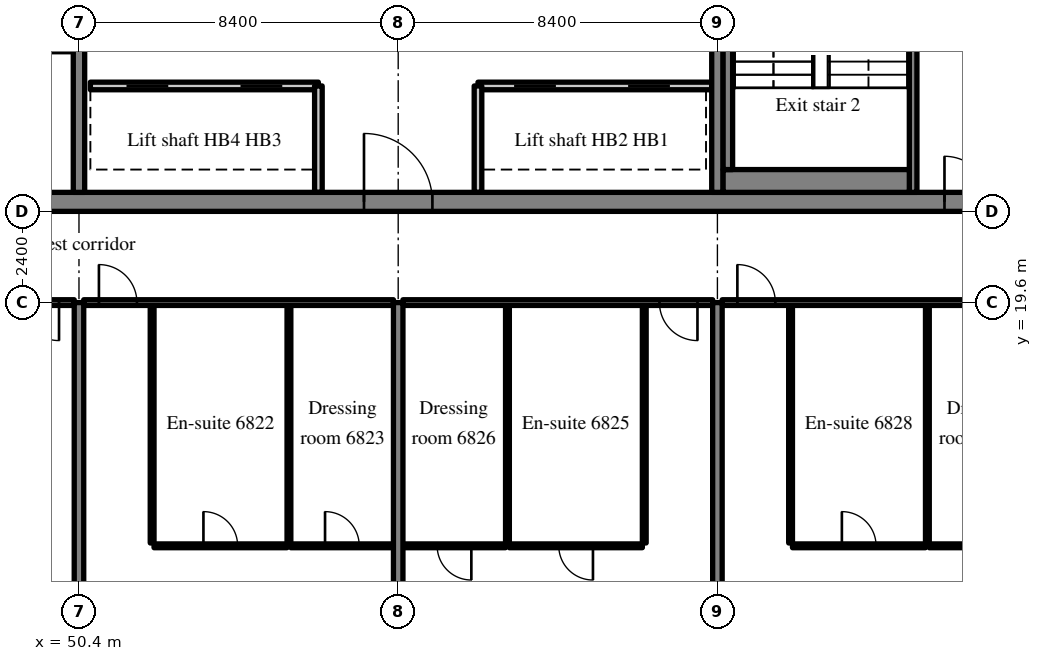
"""IFC4 building model, lengths in metres.
Left out: names, types, materials, properties, quantities, classifications, styles, units other than length and angle.
Written with IfcOpenShell. Run it as: python <this file> out.ifc"""

import sys

from ifc_helpers import new_model, si_unit, direction, frame, frame_2d, origin, place, context, subcontext, project, spatial, rectangle, extrude, source, transform, mapped, element, fill, save


model = new_model("IFC4")
c1 = context("Model", 3, precision=1e-05, world=origin(), true_north=direction((0.0, 1.0)))
c2 = subcontext(c1, "Body", "Model", "MODEL_VIEW")
j1 = project(units=[si_unit("LENGTHUNIT", "METRE"), si_unit("PLANEANGLEUNIT", "RADIAN")], contexts=[c1])
p1 = place(None, origin())
s1 = spatial("IfcSite", under=j1, at=p1, CompositionType="ELEMENT")
p2 = place(p1, origin())
s2 = spatial("IfcBuilding", under=s1, at=p2, CompositionType="ELEMENT")
p3 = place(p2, frame((0.0, 0.0, 285.7)))
s3 = spatial("IfcBuildingStorey", under=s2, at=p3, CompositionType="ELEMENT", Elevation=285.7)
m1 = source(origin(), c2, "Body", "SweptSolid", [
    extrude(rectangle(XDim=50.4, YDim=0.5, at=frame_2d((25.2, 0.0))), origin(), (0.0, 0.0, 1.0), 3.72),
])
p4 = place(p3, frame((25.2, 22.25, 0.0), z_axis=(0.0, 0.0, 1.0), x_axis=(1.0, 0.0, 0.0)))
e1 = element("IfcWall", 1, at=p4, inside=s3, PredefinedType="SHEAR", context=c2, shape_type="MappedRepresentation", body=[
    mapped(m1, transform((0.0, 0.0, 0.0), scale=1.0)),
])
m2 = source(origin(), c2, "Body", "SweptSolid", [
    extrude(rectangle(XDim=1.8, YDim=2.1, at=frame_2d((0.9, 1.05))), frame((0.0, 0.26, 0.0), z_axis=(0.0, -1.0, 0.0), x_axis=(1.0, 0.0, 0.0)), (0.0, 0.0, 1.0), 0.52),
])
p5 = place(p4, frame((15.9, 0.0, 0.0)))
e2 = element("IfcOpeningElement", 2, at=p5, cuts=e1, PredefinedType="OPENING", context=c2, shape_type="MappedRepresentation", body=[
    mapped(m2, transform((0.0, 0.0, 0.0), scale=1.0)),
])
m3 = source(origin(), c2, "Body", "SweptSolid", [
    extrude(rectangle(XDim=0.9, YDim=2.1, at=frame_2d((0.45, 1.05))), frame((0.0, 0.26, 0.0), z_axis=(0.0, -1.0, 0.0), x_axis=(1.0, 0.0, 0.0)), (0.0, 0.0, 1.0), 0.52),
])
p6 = place(p4, frame((21.525, 0.0, 0.0)))
e3 = element("IfcOpeningElement", 3, at=p6, cuts=e1, PredefinedType="OPENING", context=c2, shape_type="MappedRepresentation", body=[
    mapped(m3, transform((0.0, 0.0, 0.0), scale=1.0)),
])
p7 = place(p4, frame((32.7, 0.0, 0.0)))
e4 = element("IfcOpeningElement", 4, at=p7, cuts=e1, PredefinedType="OPENING", context=c2, shape_type="MappedRepresentation", body=[
    mapped(m2, transform((0.0, 0.0, 0.0), scale=1.0)),
])
m4 = source(origin(), c2, "Body", "SweptSolid", [
    extrude(rectangle(XDim=1.2, YDim=2.1, at=frame_2d((0.6, 1.05))), frame((0.0, 0.26, 0.0), z_axis=(0.0, -1.0, 0.0), x_axis=(1.0, 0.0, 0.0)), (0.0, 0.0, 1.0), 0.52),
])
p8 = place(p4, frame((6.5, 0.0, 0.0)))
e5 = element("IfcOpeningElement", 5, at=p8, cuts=e1, PredefinedType="OPENING", context=c2, shape_type="MappedRepresentation", body=[
    mapped(m4, transform((0.0, 0.0, 0.0), scale=1.0)),
])
p9 = place(p4, frame((47.975, 0.0, 0.0)))
e6 = element("IfcOpeningElement", 6, at=p9, cuts=e1, PredefinedType="OPENING", context=c2, shape_type="MappedRepresentation", body=[
    mapped(m4, transform((0.0, 0.0, 0.0), scale=1.0)),
])
m5 = source(origin(), c2, "Body", "SweptSolid", [
    extrude(rectangle(XDim=19.0, YDim=0.3, at=frame_2d((9.5, 0.0))), origin(), (0.0, 0.0, 1.0), 3.72),
])
p10 = place(p3, frame((50.4, 22.5, 0.0), z_axis=(0.0, 0.0, 1.0), x_axis=(0.0, 1.0, 0.0)))
e7 = element("IfcWall", 7, at=p10, inside=s3, PredefinedType="SHEAR", context=c2, shape_type="MappedRepresentation", body=[
    mapped(m5, transform((0.0, 0.0, 0.0), scale=1.0)),
])
m6 = source(origin(), c2, "Body", "SweptSolid", [
    extrude(rectangle(XDim=1.1, YDim=2.1, at=frame_2d((0.55, 1.05))), frame((0.0, 0.16, 0.0), z_axis=(0.0, -1.0, 0.0), x_axis=(1.0, 0.0, 0.0)), (0.0, 0.0, 1.0), 0.32),
])
p11 = place(p10, frame((12.95, 0.0, 0.0)))
e8 = element("IfcOpeningElement", 8, at=p11, cuts=e7, PredefinedType="OPENING", context=c2, shape_type="MappedRepresentation", body=[
    mapped(m6, transform((0.0, 0.0, 0.0), scale=1.0)),
])
p12 = place(p3, frame((67.2, 22.5, 0.0), z_axis=(0.0, 0.0, 1.0), x_axis=(0.0, 1.0, 0.0)))
e9 = element("IfcWall", 9, at=p12, inside=s3, PredefinedType="SHEAR", context=c2, shape_type="MappedRepresentation", body=[
    mapped(m5, transform((0.0, 0.0, 0.0), scale=1.0)),
])
m7 = source(origin(), c2, "Body", "SweptSolid", [
    extrude(rectangle(XDim=13.1, YDim=0.25, at=frame_2d((6.55, 0.0))), origin(), (0.0, 0.0, 1.0), 3.72),
])
p13 = place(p3, frame((50.4, 6.5, 0.0), z_axis=(0.0, 0.0, 1.0), x_axis=(0.0, 1.0, 0.0)))
e10 = element("IfcWall", 10, at=p13, inside=s3, PredefinedType="SHEAR", context=c2, shape_type="MappedRepresentation", body=[
    mapped(m7, transform((0.0, 0.0, 0.0), scale=1.0)),
])
m8 = source(origin(), c2, "Body", "SweptSolid", [
    extrude(rectangle(XDim=14.1, YDim=0.25, at=frame_2d((7.05, 0.0))), origin(), (0.0, 0.0, 1.0), 3.72),
])
for number, where, z_axis, x_axis in (
    (11, (58.8, 5.5, 0.0), (0.0, 0.0, 1.0), (0.0, 1.0, 0.0)),
    (12, (67.2, 5.5, 0.0), (0.0, 0.0, 1.0), (0.0, 1.0, 0.0)),
):
    element("IfcWall", number, at=place(p3, frame(where, z_axis=z_axis, x_axis=x_axis)), inside=s3, PredefinedType="SHEAR", context=c2, shape_type="MappedRepresentation", body=[
        mapped(m8, transform((0.0, 0.0, 0.0), scale=1.0)),
    ])
m9 = source(origin(), c2, "Body", "SweptSolid", [
    extrude(rectangle(XDim=6.15, YDim=0.2, at=frame_2d((3.075, 0.0))), origin(), (0.0, 0.0, 1.0), 3.72),
])
p14 = place(p3, frame((67.05, 25.3, 0.0), z_axis=(0.0, 0.0, 1.0), x_axis=(-1.0, 0.0, 0.0)))
e13 = element("IfcWall", 13, at=p14, inside=s3, PredefinedType="SOLIDWALL", context=c2, shape_type="MappedRepresentation", body=[
    mapped(m9, transform((0.0, 0.0, 0.0), scale=1.0)),
])
m10 = source(origin(), c2, "Body", "SweptSolid", [
    extrude(rectangle(XDim=1.1, YDim=2.1, at=frame_2d((0.55, 1.05))), frame((0.0, 0.11, 0.0), z_axis=(0.0, -1.0, 0.0), x_axis=(1.0, 0.0, 0.0)), (0.0, 0.0, 1.0), 0.22),
])
p15 = place(p14, frame((1.1, 0.0, 0.0)))
e14 = element("IfcOpeningElement", 14, at=p15, cuts=e13, PredefinedType="OPENING", context=c2, shape_type="MappedRepresentation", body=[
    mapped(m10, transform((0.0, 0.0, 0.0), scale=1.0)),
])
p16 = place(p14, frame((4.1, 0.0, 0.0)))
e15 = element("IfcOpeningElement", 15, at=p16, cuts=e13, PredefinedType="OPENING", context=c2, shape_type="MappedRepresentation", body=[
    mapped(m10, transform((0.0, 0.0, 0.0), scale=1.0)),
])
m11 = source(origin(), c2, "Body", "SweptSolid", [
    extrude(rectangle(XDim=6.0, YDim=0.2, at=frame_2d((3.0, 0.0))), origin(), (0.0, 0.0, 1.0), 3.72),
])
p17 = place(p3, frame((56.7, 25.3, 0.0), z_axis=(0.0, 0.0, 1.0), x_axis=(-1.0, 0.0, 0.0)))
e16 = element("IfcWall", 16, at=p17, inside=s3, PredefinedType="SOLIDWALL", context=c2, shape_type="MappedRepresentation", body=[
    mapped(m11, transform((0.0, 0.0, 0.0), scale=1.0)),
])
p18 = place(p17, frame((0.95, 0.0, 0.0)))
e17 = element("IfcOpeningElement", 17, at=p18, cuts=e16, PredefinedType="OPENING", context=c2, shape_type="MappedRepresentation", body=[
    mapped(m10, transform((0.0, 0.0, 0.0), scale=1.0)),
])
p19 = place(p17, frame((3.95, 0.0, 0.0)))
e18 = element("IfcOpeningElement", 18, at=p19, cuts=e16, PredefinedType="OPENING", context=c2, shape_type="MappedRepresentation", body=[
    mapped(m10, transform((0.0, 0.0, 0.0), scale=1.0)),
])
m12 = source(origin(), c2, "Body", "SweptSolid", [
    extrude(rectangle(XDim=2.8, YDim=0.2, at=frame_2d((1.4, 0.0))), origin(), (0.0, 0.0, 1.0), 3.72),
])
for number, where, z_axis, x_axis in (
    (19, (60.9, 22.5, 0.0), (0.0, 0.0, 1.0), (0.0, 1.0, 0.0)),
    (20, (56.7, 22.5, 0.0), (0.0, 0.0, 1.0), (0.0, 1.0, 0.0)),
):
    element("IfcWall", number, at=place(p3, frame(where, z_axis=z_axis, x_axis=x_axis)), inside=s3, PredefinedType="SOLIDWALL", context=c2, shape_type="MappedRepresentation", body=[
        mapped(m12, transform((0.0, 0.0, 0.0), scale=1.0)),
    ])
m13 = source(origin(), c2, "Body", "SweptSolid", [
    extrude(rectangle(XDim=8.95, YDim=0.2, at=frame_2d((4.475, 0.0))), origin(), (0.0, 0.0, 1.0), 3.72),
])
p20 = place(p3, frame((72.35, 22.5, 0.0), z_axis=(0.0, 0.0, 1.0), x_axis=(0.0, 1.0, 0.0)))
e21 = element("IfcWall", 21, at=p20, inside=s3, PredefinedType="SOLIDWALL", context=c2, shape_type="MappedRepresentation", body=[
    mapped(m13, transform((0.0, 0.0, 0.0), scale=1.0)),
])
m14 = source(origin(), c2, "Body", "SweptSolid", [
    extrude(rectangle(XDim=1.2, YDim=2.1, at=frame_2d((0.6, 1.05))), frame((0.0, 0.11, 0.0), z_axis=(0.0, -1.0, 0.0), x_axis=(1.0, 0.0, 0.0)), (0.0, 0.0, 1.0), 0.22),
])
p21 = place(p20, frame((7.0, 0.0, 0.0)))
e22 = element("IfcOpeningElement", 22, at=p21, cuts=e21, PredefinedType="OPENING", context=c2, shape_type="MappedRepresentation", body=[
    mapped(m14, transform((0.0, 0.0, 0.0), scale=1.0)),
])
m15 = source(origin(), c2, "Body", "SweptSolid", [
    extrude(rectangle(XDim=4.9, YDim=0.6, at=frame_2d((2.45, 0.0))), origin(), (0.0, 0.0, 1.0), 3.72),
])
p22 = place(p3, frame((67.35, 22.8, 0.0), z_axis=(0.0, 0.0, 1.0), x_axis=(1.0, 0.0, 0.0)))
e23 = element("IfcWall", 23, at=p22, inside=s3, PredefinedType="SOLIDWALL", context=c2, shape_type="MappedRepresentation", body=[
    mapped(m15, transform((0.0, 0.0, 0.0), scale=1.0)),
])
m16 = source(origin(), c2, "Body", "SweptSolid", [
    extrude(rectangle(XDim=8.1, YDim=0.25, at=frame_2d((4.05, 0.0))), origin(), (0.0, 0.0, 1.0), 3.72),
])
p23 = place(p3, frame((67.475, 23.1, 0.0), z_axis=(0.0, 0.0, 1.0), x_axis=(0.0, 1.0, 0.0)))
e24 = element("IfcWall", 24, at=p23, inside=s3, PredefinedType="SOLIDWALL", context=c2, shape_type="MappedRepresentation", body=[
    mapped(m16, transform((0.0, 0.0, 0.0), scale=1.0)),
])
m17 = source(origin(), c2, "Body", "SweptSolid", [
    extrude(rectangle(XDim=8.15, YDim=0.15, at=frame_2d((4.075, 0.0))), origin(), (0.0, 0.0, 1.0), 3.02),
])
p24 = place(p3, frame((42.125, 19.6, 0.0), z_axis=(0.0, 0.0, 1.0), x_axis=(1.0, 0.0, 0.0)))
e25 = element("IfcWall", 25, at=p24, inside=s3, PredefinedType="PARTITIONING", context=c2, shape_type="MappedRepresentation", body=[
    mapped(m17, transform((0.0, 0.0, 0.0), scale=1.0)),
])
m18 = source(origin(), c2, "Body", "SweptSolid", [
    extrude(rectangle(XDim=1.0, YDim=2.1, at=frame_2d((0.5, 1.05))), frame((0.0, 0.085, 0.0), z_axis=(0.0, -1.0, 0.0), x_axis=(1.0, 0.0, 0.0)), (0.0, 0.0, 1.0), 0.17),
])
p25 = place(p24, frame((6.75, 0.0, 0.0)))
e26 = element("IfcOpeningElement", 26, at=p25, cuts=e25, PredefinedType="OPENING", context=c2, shape_type="MappedRepresentation", body=[
    mapped(m18, transform((0.0, 0.0, 0.0), scale=1.0)),
])
m19 = source(origin(), c2, "Body", "SweptSolid", [
    extrude(rectangle(XDim=6.25, YDim=0.1, at=frame_2d((3.125, 0.0))), origin(), (0.0, 0.0, 1.0), 3.72),
])
for number, where, z_axis, x_axis in (
    (27, (52.325, 13.275, 0.0), (0.0, 0.0, 1.0), (0.0, 1.0, 0.0)),
    (28, (55.925, 13.275, 0.0), (0.0, 0.0, 1.0), (0.0, 1.0, 0.0)),
):
    element("IfcWall", number, at=place(p3, frame(where, z_axis=z_axis, x_axis=x_axis)), inside=s3, PredefinedType="PARTITIONING", context=c2, shape_type="MappedRepresentation", body=[
        mapped(m19, transform((0.0, 0.0, 0.0), scale=1.0)),
    ])
m20 = source(origin(), c2, "Body", "SweptSolid", [
    extrude(rectangle(XDim=3.5, YDim=0.1, at=frame_2d((1.75, 0.0))), origin(), (0.0, 0.0, 1.0), 3.72),
])
p26 = place(p3, frame((52.375, 13.2, 0.0), z_axis=(0.0, 0.0, 1.0), x_axis=(1.0, 0.0, 0.0)))
e29 = element("IfcWall", 29, at=p26, inside=s3, PredefinedType="PARTITIONING", context=c2, shape_type="MappedRepresentation", body=[
    mapped(m20, transform((0.0, 0.0, 0.0), scale=1.0)),
])
m21 = source(origin(), c2, "Body", "SweptSolid", [
    extrude(rectangle(XDim=0.9, YDim=2.1, at=frame_2d((0.45, 1.05))), frame((0.0, 0.06, 0.0), z_axis=(0.0, -1.0, 0.0), x_axis=(1.0, 0.0, 0.0)), (0.0, 0.0, 1.0), 0.12),
])
p27 = place(p26, frame((1.3, 0.0, 0.0)))
e30 = element("IfcOpeningElement", 30, at=p27, cuts=e29, PredefinedType="OPENING", context=c2, shape_type="MappedRepresentation", body=[
    mapped(m21, transform((0.0, 0.0, 0.0), scale=1.0)),
])
m22 = source(origin(), c2, "Body", "SweptSolid", [
    extrude(rectangle(XDim=2.7, YDim=0.1, at=frame_2d((1.35, 0.0))), origin(), (0.0, 0.0, 1.0), 3.72),
])
p28 = place(p3, frame((55.975, 13.2, 0.0), z_axis=(0.0, 0.0, 1.0), x_axis=(1.0, 0.0, 0.0)))
e31 = element("IfcWall", 31, at=p28, inside=s3, PredefinedType="PARTITIONING", context=c2, shape_type="MappedRepresentation", body=[
    mapped(m22, transform((0.0, 0.0, 0.0), scale=1.0)),
])
p29 = place(p28, frame((0.9, 0.0, 0.0)))
e32 = element("IfcOpeningElement", 32, at=p29, cuts=e31, PredefinedType="OPENING", context=c2, shape_type="MappedRepresentation", body=[
    mapped(m21, transform((0.0, 0.0, 0.0), scale=1.0)),
])
m23 = source(origin(), c2, "Body", "SweptSolid", [
    extrude(rectangle(XDim=8.15, YDim=0.15, at=frame_2d((4.075, 0.0))), origin(), (0.0, 0.0, 1.0), 3.02),
])
p30 = place(p3, frame((50.525, 19.6, 0.0), z_axis=(0.0, 0.0, 1.0), x_axis=(1.0, 0.0, 0.0)))
e33 = element("IfcWall", 33, at=p30, inside=s3, PredefinedType="PARTITIONING", context=c2, shape_type="MappedRepresentation", body=[
    mapped(m23, transform((0.0, 0.0, 0.0), scale=1.0)),
])
p31 = place(p30, frame((0.4, 0.0, 0.0)))
e34 = element("IfcOpeningElement", 34, at=p31, cuts=e33, PredefinedType="OPENING", context=c2, shape_type="MappedRepresentation", body=[
    mapped(m18, transform((0.0, 0.0, 0.0), scale=1.0)),
])
for number, where, z_axis, x_axis in (
    (35, (65.275, 13.275, 0.0), (0.0, 0.0, 1.0), (0.0, 1.0, 0.0)),
    (36, (61.675, 13.275, 0.0), (0.0, 0.0, 1.0), (0.0, 1.0, 0.0)),
):
    element("IfcWall", number, at=place(p3, frame(where, z_axis=z_axis, x_axis=x_axis)), inside=s3, PredefinedType="PARTITIONING", context=c2, shape_type="MappedRepresentation", body=[
        mapped(m19, transform((0.0, 0.0, 0.0), scale=1.0)),
    ])
p32 = place(p3, frame((61.725, 13.2, 0.0), z_axis=(0.0, 0.0, 1.0), x_axis=(1.0, 0.0, 0.0)))
e37 = element("IfcWall", 37, at=p32, inside=s3, PredefinedType="PARTITIONING", context=c2, shape_type="MappedRepresentation", body=[
    mapped(m20, transform((0.0, 0.0, 0.0), scale=1.0)),
])
p33 = place(p32, frame((1.3, 0.0, 0.0)))
e38 = element("IfcOpeningElement", 38, at=p33, cuts=e37, PredefinedType="OPENING", context=c2, shape_type="MappedRepresentation", body=[
    mapped(m21, transform((0.0, 0.0, 0.0), scale=1.0)),
])
p34 = place(p3, frame((58.925, 13.2, 0.0), z_axis=(0.0, 0.0, 1.0), x_axis=(1.0, 0.0, 0.0)))
e39 = element("IfcWall", 39, at=p34, inside=s3, PredefinedType="PARTITIONING", context=c2, shape_type="MappedRepresentation", body=[
    mapped(m22, transform((0.0, 0.0, 0.0), scale=1.0)),
])
p35 = place(p34, frame((0.9, 0.0, 0.0)))
e40 = element("IfcOpeningElement", 40, at=p35, cuts=e39, PredefinedType="OPENING", context=c2, shape_type="MappedRepresentation", body=[
    mapped(m21, transform((0.0, 0.0, 0.0), scale=1.0)),
])
p36 = place(p3, frame((58.925, 19.6, 0.0), z_axis=(0.0, 0.0, 1.0), x_axis=(1.0, 0.0, 0.0)))
e41 = element("IfcWall", 41, at=p36, inside=s3, PredefinedType="PARTITIONING", context=c2, shape_type="MappedRepresentation", body=[
    mapped(m17, transform((0.0, 0.0, 0.0), scale=1.0)),
])
p37 = place(p36, frame((6.75, 0.0, 0.0)))
e42 = element("IfcOpeningElement", 42, at=p37, cuts=e41, PredefinedType="OPENING", context=c2, shape_type="MappedRepresentation", body=[
    mapped(m18, transform((0.0, 0.0, 0.0), scale=1.0)),
])
for number, where, z_axis, x_axis in (
    (43, (69.125, 13.275, 0.0), (0.0, 0.0, 1.0), (0.0, 1.0, 0.0)),
    (44, (72.725, 13.275, 0.0), (0.0, 0.0, 1.0), (0.0, 1.0, 0.0)),
):
    element("IfcWall", number, at=place(p3, frame(where, z_axis=z_axis, x_axis=x_axis)), inside=s3, PredefinedType="PARTITIONING", context=c2, shape_type="MappedRepresentation", body=[
        mapped(m19, transform((0.0, 0.0, 0.0), scale=1.0)),
    ])
p38 = place(p3, frame((69.175, 13.2, 0.0), z_axis=(0.0, 0.0, 1.0), x_axis=(1.0, 0.0, 0.0)))
e45 = element("IfcWall", 45, at=p38, inside=s3, PredefinedType="PARTITIONING", context=c2, shape_type="MappedRepresentation", body=[
    mapped(m20, transform((0.0, 0.0, 0.0), scale=1.0)),
])
p39 = place(p38, frame((1.3, 0.0, 0.0)))
e46 = element("IfcOpeningElement", 46, at=p39, cuts=e45, PredefinedType="OPENING", context=c2, shape_type="MappedRepresentation", body=[
    mapped(m21, transform((0.0, 0.0, 0.0), scale=1.0)),
])
m24 = source(origin(), c2, "Body", "SweptSolid", [
    extrude(rectangle(XDim=2.7, YDim=0.1, at=frame_2d((1.35, 0.0))), origin(), (0.0, 0.0, 1.0), 3.72),
])
p40 = place(p3, frame((72.775, 13.2, 0.0), z_axis=(0.0, 0.0, 1.0), x_axis=(1.0, 0.0, 0.0)))
e47 = element("IfcWall", 47, at=p40, inside=s3, PredefinedType="PARTITIONING", context=c2, shape_type="MappedRepresentation", body=[
    mapped(m24, transform((0.0, 0.0, 0.0), scale=1.0)),
])
p41 = place(p40, frame((0.9, 0.0, 0.0)))
e48 = element("IfcOpeningElement", 48, at=p41, cuts=e47, PredefinedType="OPENING", context=c2, shape_type="MappedRepresentation", body=[
    mapped(m21, transform((0.0, 0.0, 0.0), scale=1.0)),
])
p42 = place(p3, frame((67.325, 19.6, 0.0), z_axis=(0.0, 0.0, 1.0), x_axis=(1.0, 0.0, 0.0)))
e49 = element("IfcWall", 49, at=p42, inside=s3, PredefinedType="PARTITIONING", context=c2, shape_type="MappedRepresentation", body=[
    mapped(m23, transform((0.0, 0.0, 0.0), scale=1.0)),
])
p43 = place(p42, frame((0.4, 0.0, 0.0)))
e50 = element("IfcOpeningElement", 50, at=p43, cuts=e49, PredefinedType="OPENING", context=c2, shape_type="MappedRepresentation", body=[
    mapped(m18, transform((0.0, 0.0, 0.0), scale=1.0)),
])
m25 = source(origin(), c2, "Body", "SweptSolid", [
    extrude(rectangle(XDim=1.8, YDim=2.1, at=frame_2d((0.9, 1.05))), frame((0.0, 0.175, 0.0), z_axis=(0.0, -1.0, 0.0), x_axis=(1.0, 0.0, 0.0)), (0.0, 0.0, 1.0), 0.05),
])
p44 = place(p7, origin())
e51 = element("IfcDoor", 51, at=p44, inside=s3, OperationType="DOUBLE_DOOR_SINGLE_SWING", PredefinedType="DOOR", context=c2, shape_type="MappedRepresentation", body=[
    mapped(m25, transform((0.0, 0.0, 0.0), scale=1.0)),
])
fill(e4, e51)
m26 = source(origin(), c2, "Body", "SweptSolid", [
    extrude(rectangle(XDim=1.1, YDim=2.1, at=frame_2d((0.55, 1.05))), frame((0.0, 0.025, 0.0), z_axis=(0.0, -1.0, 0.0), x_axis=(1.0, 0.0, 0.0)), (0.0, 0.0, 1.0), 0.05),
])
p45 = place(p15, origin())
e52 = element("IfcDoor", 52, at=p45, inside=s3, OperationType="SLIDING_TO_RIGHT", PredefinedType="DOOR", context=c2, shape_type="MappedRepresentation", body=[
    mapped(m26, transform((0.0, 0.0, 0.0), scale=1.0)),
])
fill(e14, e52)
p46 = place(p16, origin())
e53 = element("IfcDoor", 53, at=p46, inside=s3, OperationType="SLIDING_TO_LEFT", PredefinedType="DOOR", context=c2, shape_type="MappedRepresentation", body=[
    mapped(m26, transform((0.0, 0.0, 0.0), scale=1.0)),
])
fill(e15, e53)
p47 = place(p18, origin())
e54 = element("IfcDoor", 54, at=p47, inside=s3, OperationType="SLIDING_TO_RIGHT", PredefinedType="DOOR", context=c2, shape_type="MappedRepresentation", body=[
    mapped(m26, transform((0.0, 0.0, 0.0), scale=1.0)),
])
fill(e17, e54)
p48 = place(p19, origin())
e55 = element("IfcDoor", 55, at=p48, inside=s3, OperationType="SLIDING_TO_LEFT", PredefinedType="DOOR", context=c2, shape_type="MappedRepresentation", body=[
    mapped(m26, transform((0.0, 0.0, 0.0), scale=1.0)),
])
fill(e18, e55)
m27 = source(origin(), c2, "Body", "SweptSolid", [
    extrude(rectangle(XDim=1.2, YDim=2.1, at=frame_2d((0.6, 1.05))), frame((0.0, 0.175, 0.0), z_axis=(0.0, -1.0, 0.0), x_axis=(1.0, 0.0, 0.0)), (0.0, 0.0, 1.0), 0.05),
])
p49 = place(p9, origin())
e56 = element("IfcDoor", 56, at=p49, inside=s3, OperationType="SINGLE_SWING_LEFT", PredefinedType="DOOR", context=c2, shape_type="MappedRepresentation", body=[
    mapped(m27, transform((0.0, 0.0, 0.0), scale=1.0)),
])
fill(e6, e56)
m28 = source(origin(), c2, "Body", "SweptSolid", [
    extrude(rectangle(XDim=1.0, YDim=2.1, at=frame_2d((0.5, 1.05))), frame((0.0, 0.025, 0.0), z_axis=(0.0, -1.0, 0.0), x_axis=(1.0, 0.0, 0.0)), (0.0, 0.0, 1.0), 0.05),
])
p50 = place(p25, origin())
e57 = element("IfcDoor", 57, at=p50, inside=s3, OperationType="SINGLE_SWING_RIGHT", PredefinedType="DOOR", context=c2, shape_type="MappedRepresentation", body=[
    mapped(m28, transform((0.0, 0.0, 0.0), scale=1.0)),
])
fill(e26, e57)
m29 = source(origin(), c2, "Body", "SweptSolid", [
    extrude(rectangle(XDim=0.9, YDim=2.1, at=frame_2d((0.45, 1.05))), frame((0.0, 0.025, 0.0), z_axis=(0.0, -1.0, 0.0), x_axis=(1.0, 0.0, 0.0)), (0.0, 0.0, 1.0), 0.05),
])
p51 = place(p27, origin())
e58 = element("IfcDoor", 58, at=p51, inside=s3, OperationType="SINGLE_SWING_LEFT", PredefinedType="DOOR", context=c2, shape_type="MappedRepresentation", body=[
    mapped(m29, transform((0.0, 0.0, 0.0), scale=1.0)),
])
fill(e30, e58)
p52 = place(p29, origin())
e59 = element("IfcDoor", 59, at=p52, inside=s3, OperationType="SINGLE_SWING_LEFT", PredefinedType="DOOR", context=c2, shape_type="MappedRepresentation", body=[
    mapped(m29, transform((0.0, 0.0, 0.0), scale=1.0)),
])
fill(e32, e59)
p53 = place(p31, origin())
e60 = element("IfcDoor", 60, at=p53, inside=s3, OperationType="SINGLE_SWING_LEFT", PredefinedType="DOOR", context=c2, shape_type="MappedRepresentation", body=[
    mapped(m28, transform((0.0, 0.0, 0.0), scale=1.0)),
])
fill(e34, e60)
p54 = place(p33, origin())
e61 = element("IfcDoor", 61, at=p54, inside=s3, OperationType="SINGLE_SWING_RIGHT", PredefinedType="DOOR", context=c2, shape_type="MappedRepresentation", body=[
    mapped(m29, transform((0.0, 0.0, 0.0), scale=1.0)),
])
fill(e38, e61)
p55 = place(p35, origin())
e62 = element("IfcDoor", 62, at=p55, inside=s3, OperationType="SINGLE_SWING_RIGHT", PredefinedType="DOOR", context=c2, shape_type="MappedRepresentation", body=[
    mapped(m29, transform((0.0, 0.0, 0.0), scale=1.0)),
])
fill(e40, e62)
p56 = place(p37, origin())
e63 = element("IfcDoor", 63, at=p56, inside=s3, OperationType="SINGLE_SWING_RIGHT", PredefinedType="DOOR", context=c2, shape_type="MappedRepresentation", body=[
    mapped(m28, transform((0.0, 0.0, 0.0), scale=1.0)),
])
fill(e42, e63)
p57 = place(p39, origin())
e64 = element("IfcDoor", 64, at=p57, inside=s3, OperationType="SINGLE_SWING_LEFT", PredefinedType="DOOR", context=c2, shape_type="MappedRepresentation", body=[
    mapped(m29, transform((0.0, 0.0, 0.0), scale=1.0)),
])
fill(e46, e64)
p58 = place(p43, origin())
e65 = element("IfcDoor", 65, at=p58, inside=s3, OperationType="SINGLE_SWING_LEFT", PredefinedType="DOOR", context=c2, shape_type="MappedRepresentation", body=[
    mapped(m28, transform((0.0, 0.0, 0.0), scale=1.0)),
])
fill(e50, e65)
save(model, sys.argv[1])
